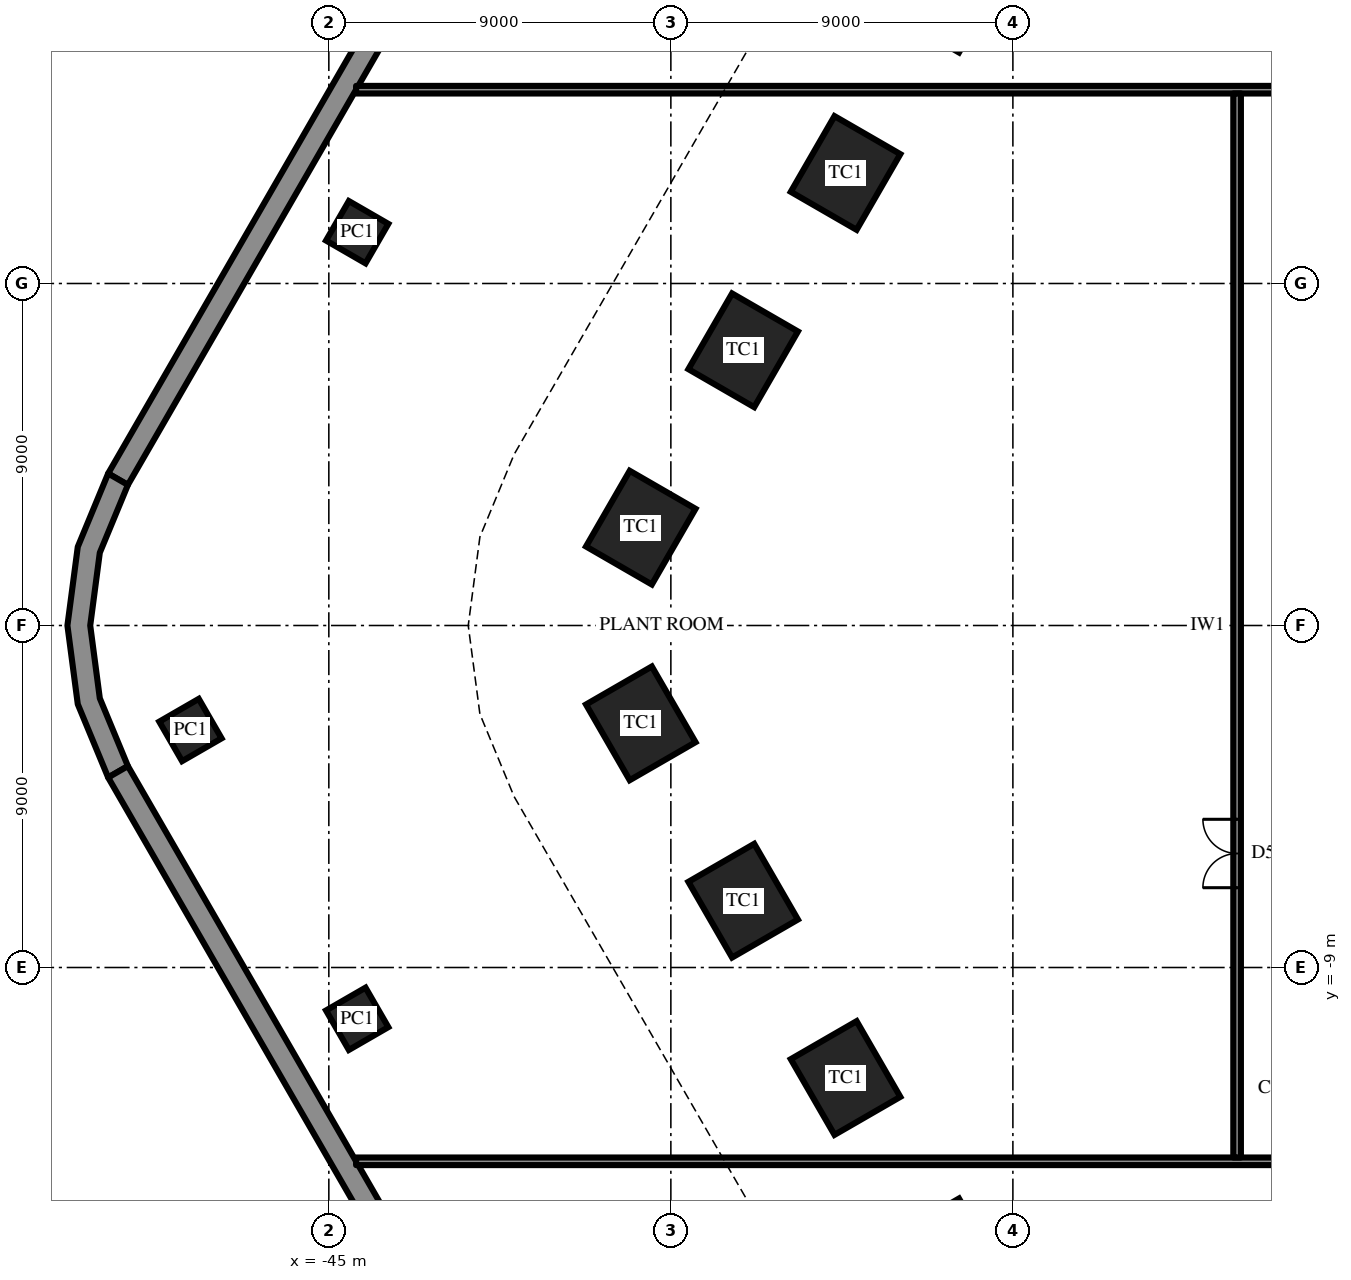
"""IFC4 building model, lengths in metres.
Left out: names, types, materials, properties, quantities, classifications, styles, units other than length and angle.
Written with IfcOpenShell. Run it as: python <this file> out.ifc"""

import sys

from ifc_helpers import new_model, si_unit, direction, frame, frame_2d, origin, origin_2d, place, context, subcontext, project, spatial, polyline, rectangle, outline, extrude, element, fill, save


model = new_model("IFC4")
c1 = context("Model", 3, precision=1e-05, world=origin(), true_north=direction((0.0, 1.0)))
c2 = subcontext(c1, "Body", "Model", "MODEL_VIEW")
j1 = project(units=[si_unit("LENGTHUNIT", "METRE"), si_unit("PLANEANGLEUNIT", "RADIAN")], contexts=[c1])
p1 = place(None, origin())
s1 = spatial("IfcSite", under=j1, at=p1, CompositionType="ELEMENT")
p2 = place(p1, origin())
s2 = spatial("IfcBuilding", under=s1, at=p2, CompositionType="ELEMENT")
p3 = place(p2, frame((0.0, 0.0, -9.0)))
s3 = spatial("IfcBuildingStorey", under=s2, at=p3, CompositionType="ELEMENT", Elevation=-9.0)
for number, where, z_axis, x_axis in (
    (1, (-28.709, 16.575, 0.0), (0.0, 0.0, 1.0), (-0.5, -0.866, 0.0)),
    (2, (-31.403, 11.908, 0.0), (0.0, 0.0, 1.0), (-0.5, -0.866, 0.0)),
    (3, (-34.097, 7.242, 0.0), (0.0, 0.0, 1.0), (-0.5, -0.866, 0.0)),
    (4, (-36.792, 2.575, 0.0), (0.0, 0.0, 1.0), (-0.5, -0.866, 0.0)),
    (5, (-36.792, -2.575, 0.0), (0.0, 0.0, 1.0), (0.5, -0.866, 0.0)),
    (6, (-34.097, -7.242, 0.0), (0.0, 0.0, 1.0), (0.5, -0.866, 0.0)),
    (7, (-31.403, -11.908, 0.0), (0.0, 0.0, 1.0), (0.5, -0.866, 0.0)),
    (8, (-28.709, -16.575, 0.0), (0.0, 0.0, 1.0), (0.5, -0.866, 0.0)),
):
    element("IfcColumn", number, at=place(p3, frame(where, z_axis=z_axis, x_axis=x_axis)), inside=s3, PredefinedType="COLUMN", context=c2, shape_type="SweptSolid", body=[
        extrude(rectangle(XDim=2.3, YDim=2.0, at=origin_2d()), origin(), (0.0, 0.0, 1.0), 4.5),
    ])
for number, where, z_axis, x_axis in (
    (9, (-44.254, 10.35, 0.0), (0.0, 0.0, 1.0), (-0.5, -0.866, 0.0)),
    (10, (-48.642, -2.75, 0.0), (0.0, 0.0, 1.0), (0.5, -0.866, 0.0)),
    (11, (-44.254, -10.35, 0.0), (0.0, 0.0, 1.0), (0.5, -0.866, 0.0)),
):
    element("IfcColumn", number, at=place(p3, frame(where, z_axis=z_axis, x_axis=x_axis)), inside=s3, PredefinedType="COLUMN", context=c2, shape_type="SweptSolid", body=[
        extrude(rectangle(XDim=1.2, YDim=1.2, at=origin_2d()), origin(), (0.0, 0.0, 1.0), 4.5),
    ])
p4 = place(p3, frame((-28.608, 41.85, 0.0), z_axis=(0.0, 0.0, 1.0), x_axis=(-0.500002442456, -0.866023993627, 0.0)))
e12 = element("IfcWall", 12, at=p4, inside=s3, PredefinedType="SOLIDWALL", context=c2, shape_type="SweptSolid", body=[
    extrude(rectangle(XDim=43.879, YDim=0.6, at=frame_2d((21.939, 0.0))), origin(), (0.0, 0.0, 1.0), 4.5),
])
p5 = place(p3, origin())
e13 = element("IfcWall", 13, at=p5, inside=s3, PredefinedType="SOLIDWALL", context=c2, shape_type="SweptSolid", body=[
    extrude(outline(polyline([(-50.807, 4.0), (-51.606, 2.071), (-51.879, 0.0), (-51.606, -2.071), (-50.807, -4.0), (-50.287, -3.7), (-51.026, -1.915), (-51.279, 0.0), (-51.026, 1.915), (-50.287, 3.7), (-50.807, 4.0)])), origin(), (0.0, 0.0, 1.0), 4.5),
])
p6 = place(p3, frame((-50.547, -3.85, 0.0), z_axis=(0.0, 0.0, 1.0), x_axis=(0.500002442456, -0.866023993627, 0.0)))
e14 = element("IfcWall", 14, at=p6, inside=s3, PredefinedType="SOLIDWALL", context=c2, shape_type="SweptSolid", body=[
    extrude(rectangle(XDim=43.879, YDim=0.6, at=frame_2d((21.939, 0.0))), origin(), (0.0, 0.0, 1.0), 4.5),
])
p7 = place(p3, frame((-44.283, 14.1, 0.0), z_axis=(0.0, 0.0, 1.0), x_axis=(1.0, 0.0, 0.0)))
e15 = element("IfcWall", 15, at=p7, inside=s3, PredefinedType="PARTITIONING", context=c2, shape_type="SweptSolid", body=[
    extrude(rectangle(XDim=88.565, YDim=0.2, at=frame_2d((44.283, 0.0))), origin(), (0.0, 0.0, 1.0), 4.15),
])
p8 = place(p7, frame((38.383, 0.0, 0.0)))
e16 = element("IfcOpeningElement", 16, at=p8, cuts=e15, PredefinedType="OPENING", context=c2, shape_type="SweptSolid", body=[
    extrude(rectangle(XDim=1.8, YDim=2.4, at=frame_2d((0.9, 1.2))), frame((0.0, 0.11, 0.0), z_axis=(0.0, -1.0, 0.0), x_axis=(1.0, 0.0, 0.0)), (0.0, 0.0, 1.0), 0.22),
])
p9 = place(p7, frame((55.783, 0.0, 0.0)))
e17 = element("IfcOpeningElement", 17, at=p9, cuts=e15, PredefinedType="OPENING", context=c2, shape_type="SweptSolid", body=[
    extrude(rectangle(XDim=1.0, YDim=2.2, at=frame_2d((0.5, 1.1))), frame((0.0, 0.11, 0.0), z_axis=(0.0, -1.0, 0.0), x_axis=(1.0, 0.0, 0.0)), (0.0, 0.0, 1.0), 0.22),
])
p10 = place(p7, frame((46.083, 0.0, 0.0)))
e18 = element("IfcOpeningElement", 18, at=p10, cuts=e15, PredefinedType="OPENING", context=c2, shape_type="SweptSolid", body=[
    extrude(rectangle(XDim=1.8, YDim=2.4, at=frame_2d((0.9, 1.2))), frame((0.0, 0.11, 0.0), z_axis=(0.0, -1.0, 0.0), x_axis=(1.0, 0.0, 0.0)), (0.0, 0.0, 1.0), 0.22),
])
p11 = place(p7, frame((63.633, 0.0, 0.0)))
e19 = element("IfcOpeningElement", 19, at=p11, cuts=e15, PredefinedType="OPENING", context=c2, shape_type="SweptSolid", body=[
    extrude(rectangle(XDim=1.0, YDim=2.2, at=frame_2d((0.5, 1.1))), frame((0.0, 0.11, 0.0), z_axis=(0.0, -1.0, 0.0), x_axis=(1.0, 0.0, 0.0)), (0.0, 0.0, 1.0), 0.22),
])
p12 = place(p3, frame((-44.283, -14.1, 0.0), z_axis=(0.0, 0.0, 1.0), x_axis=(1.0, 0.0, 0.0)))
e20 = element("IfcWall", 20, at=p12, inside=s3, PredefinedType="PARTITIONING", context=c2, shape_type="SweptSolid", body=[
    extrude(rectangle(XDim=88.565, YDim=0.2, at=frame_2d((44.283, 0.0))), origin(), (0.0, 0.0, 1.0), 4.15),
])
p13 = place(p12, frame((31.383, 0.0, 0.0)))
e21 = element("IfcOpeningElement", 21, at=p13, cuts=e20, PredefinedType="OPENING", context=c2, shape_type="SweptSolid", body=[
    extrude(rectangle(XDim=1.8, YDim=2.4, at=frame_2d((0.9, 1.2))), frame((0.0, 0.11, 0.0), z_axis=(0.0, -1.0, 0.0), x_axis=(1.0, 0.0, 0.0)), (0.0, 0.0, 1.0), 0.22),
])
p14 = place(p12, frame((49.883, 0.0, 0.0)))
e22 = element("IfcOpeningElement", 22, at=p14, cuts=e20, PredefinedType="OPENING", context=c2, shape_type="SweptSolid", body=[
    extrude(rectangle(XDim=1.8, YDim=2.4, at=frame_2d((0.9, 1.2))), frame((0.0, 0.11, 0.0), z_axis=(0.0, -1.0, 0.0), x_axis=(1.0, 0.0, 0.0)), (0.0, 0.0, 1.0), 0.22),
])
p15 = place(p12, frame((46.083, 0.0, 0.0)))
e23 = element("IfcOpeningElement", 23, at=p15, cuts=e20, PredefinedType="OPENING", context=c2, shape_type="SweptSolid", body=[
    extrude(rectangle(XDim=1.8, YDim=2.4, at=frame_2d((0.9, 1.2))), frame((0.0, 0.11, 0.0), z_axis=(0.0, -1.0, 0.0), x_axis=(1.0, 0.0, 0.0)), (0.0, 0.0, 1.0), 0.22),
])
p16 = place(p12, frame((63.633, 0.0, 0.0)))
e24 = element("IfcOpeningElement", 24, at=p16, cuts=e20, PredefinedType="OPENING", context=c2, shape_type="SweptSolid", body=[
    extrude(rectangle(XDim=1.0, YDim=2.2, at=frame_2d((0.5, 1.1))), frame((0.0, 0.11, 0.0), z_axis=(0.0, -1.0, 0.0), x_axis=(1.0, 0.0, 0.0)), (0.0, 0.0, 1.0), 0.22),
])
p17 = place(p3, frame((-21.1, -14.0, 0.0), z_axis=(0.0, 0.0, 1.0), x_axis=(0.0, 1.0, 0.0)))
e25 = element("IfcWall", 25, at=p17, inside=s3, PredefinedType="PARTITIONING", context=c2, shape_type="SweptSolid", body=[
    extrude(rectangle(XDim=28.0, YDim=0.2, at=frame_2d((14.0, 0.0))), origin(), (0.0, 0.0, 1.0), 4.15),
])
p18 = place(p17, frame((7.1, 0.0, 0.0)))
e26 = element("IfcOpeningElement", 26, at=p18, cuts=e25, PredefinedType="OPENING", context=c2, shape_type="SweptSolid", body=[
    extrude(rectangle(XDim=1.8, YDim=2.4, at=frame_2d((0.9, 1.2))), frame((0.0, 0.11, 0.0), z_axis=(0.0, -1.0, 0.0), x_axis=(1.0, 0.0, 0.0)), (0.0, 0.0, 1.0), 0.22),
])
p19 = place(p18, origin())
e27 = element("IfcDoor", 27, at=p19, inside=s3, OperationType="DOUBLE_DOOR_SINGLE_SWING", PredefinedType="DOOR", context=c2, shape_type="SweptSolid", body=[
    extrude(rectangle(XDim=1.8, YDim=2.4, at=frame_2d((0.9, 1.2))), frame((0.0, 0.025, 0.0), z_axis=(0.0, -1.0, 0.0), x_axis=(1.0, 0.0, 0.0)), (0.0, 0.0, 1.0), 0.05),
])
fill(e26, e27)
save(model, sys.argv[1])
